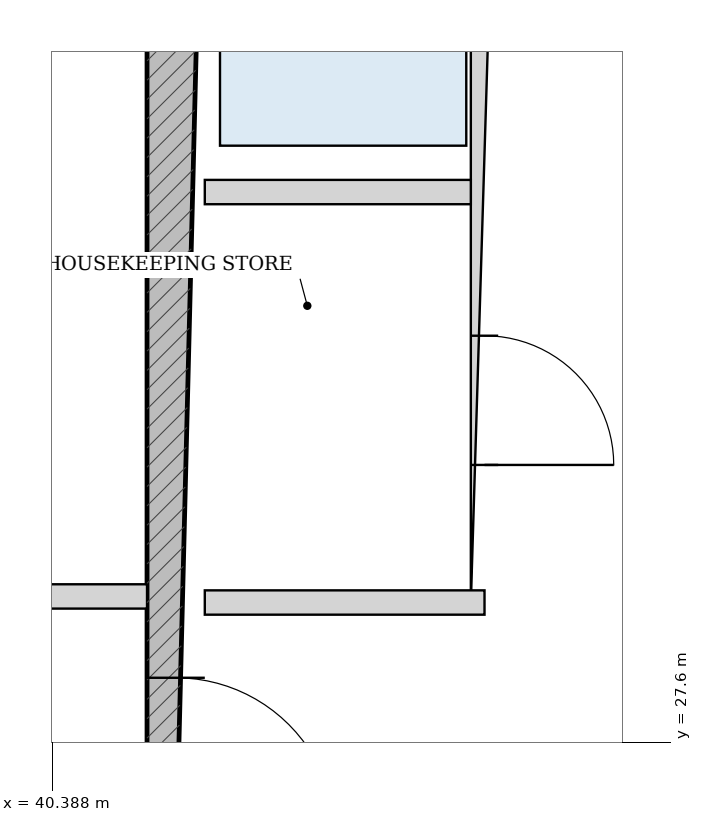
"""IFC4 building model, lengths in metres.
Left out: names, types, materials, properties, quantities, classifications, styles, units other than length and angle.
Written with IfcOpenShell. Run it as: python <this file> out.ifc"""

import sys

from ifc_helpers import new_model, si_unit, direction, frame, frame_2d, origin, place, context, subcontext, project, spatial, rectangle, extrude, source, transform, mapped, element, fill, save


model = new_model("IFC4")
c1 = context("Model", 3, precision=1e-05, world=origin(), true_north=direction((-0.2419218956, 0.970295726276)))
c2 = subcontext(c1, "Body", "Model", "MODEL_VIEW")
j1 = project(units=[si_unit("LENGTHUNIT", "METRE"), si_unit("PLANEANGLEUNIT", "RADIAN")], contexts=[c1])
p1 = place(None, origin())
s1 = spatial("IfcSite", under=j1, at=p1, CompositionType="ELEMENT")
p2 = place(p1, origin())
s2 = spatial("IfcBuilding", under=s1, at=p2, CompositionType="ELEMENT")
p3 = place(p2, frame((0.0, 0.0, 202.3)))
s3 = spatial("IfcBuildingStorey", under=s2, at=p3, CompositionType="ELEMENT", Elevation=202.3)
p4 = place(p3, frame((41.2, 19.175, 0.0), z_axis=(0.0, 0.0, 1.0), x_axis=(0.0, 1.0, 0.0)))
e1 = element("IfcWall", 1, at=p4, inside=s3, PredefinedType="SHEAR", context=c2, shape_type="SweptSolid", body=[
    extrude(rectangle(XDim=15.25, YDim=0.38, at=frame_2d((7.625, 0.0))), origin(), (0.0, 0.0, 1.0), 3.435),
])
p5 = place(p4, frame((7.8, 0.0, 0.0)))
e2 = element("IfcOpeningElement", 2, at=p5, cuts=e1, PredefinedType="OPENING", context=c2, shape_type="SweptSolid", body=[
    extrude(rectangle(XDim=1.05, YDim=2.15, at=frame_2d((0.525, 1.075))), frame((0.0, 0.2, 0.0), z_axis=(0.0, -1.0, 0.0), x_axis=(1.0, 0.0, 0.0)), (0.0, 0.0, 1.0), 0.4),
])
p6 = place(p3, frame((43.23, 28.52, 0.0), z_axis=(0.0, 0.0, 1.0), x_axis=(0.0, 1.0, 0.0)))
e3 = element("IfcWall", 3, at=p6, inside=s3, PredefinedType="PARTITIONING", context=c2, shape_type="SweptSolid", body=[
    extrude(rectangle(XDim=5.905, YDim=0.18, at=frame_2d((2.953, 0.0))), origin(), (0.0, 0.0, 1.0), 3.435),
])
p7 = place(p6, frame((0.905, 0.0, 0.0)))
e4 = element("IfcOpeningElement", 4, at=p7, cuts=e3, PredefinedType="OPENING", context=c2, shape_type="SweptSolid", body=[
    extrude(rectangle(XDim=0.85, YDim=2.1, at=frame_2d((0.425, 1.05))), frame((0.0, 0.1, 0.0), z_axis=(0.0, -1.0, 0.0), x_axis=(1.0, 0.0, 0.0)), (0.0, 0.0, 1.0), 0.2),
])
p8 = place(p6, frame((3.655, 0.0, 0.0)))
e5 = element("IfcOpeningElement", 5, at=p8, cuts=e3, PredefinedType="OPENING", context=c2, shape_type="SweptSolid", body=[
    extrude(rectangle(XDim=1.15, YDim=2.2, at=frame_2d((0.575, 1.1))), frame((0.0, 0.1, 0.0), z_axis=(0.0, -1.0, 0.0), x_axis=(1.0, 0.0, 0.0)), (0.0, 0.0, 1.0), 0.2),
])
p9 = place(p3, frame((41.39, 31.22, 0.0), z_axis=(0.0, 0.0, 1.0), x_axis=(1.0, 0.0, 0.0)))
e6 = element("IfcWall", 6, at=p9, inside=s3, PredefinedType="PARTITIONING", context=c2, shape_type="SweptSolid", body=[
    extrude(rectangle(XDim=1.75, YDim=0.16, at=frame_2d((0.875, 0.0))), origin(), (0.0, 0.0, 1.0), 3.435),
])
p10 = place(p3, frame((41.39, 28.52, 0.0), z_axis=(0.0, 0.0, 1.0), x_axis=(1.0, 0.0, 0.0)))
e7 = element("IfcWall", 7, at=p10, inside=s3, PredefinedType="PARTITIONING", context=c2, shape_type="SweptSolid", body=[
    extrude(rectangle(XDim=1.84, YDim=0.16, at=frame_2d((0.92, 0.0))), origin(), (0.0, 0.0, 1.0), 3.435),
])
p11 = place(p3, frame((34.99, 28.56, 0.0), z_axis=(0.0, 0.0, 1.0), x_axis=(1.0, 0.0, 0.0)))
e8 = element("IfcWall", 8, at=p11, inside=s3, PredefinedType="PARTITIONING", context=c2, shape_type="SweptSolid", body=[
    extrude(rectangle(XDim=6.02, YDim=0.16, at=frame_2d((3.01, 0.0))), origin(), (0.0, 0.0, 1.0), 3.435),
])
p12 = place(p11, frame((1.025, 0.0, 0.0)))
e9 = element("IfcOpeningElement", 9, at=p12, cuts=e8, PredefinedType="OPENING", context=c2, shape_type="SweptSolid", body=[
    extrude(rectangle(XDim=0.86, YDim=2.1, at=frame_2d((0.43, 1.05))), frame((0.0, 0.09, 0.0), z_axis=(0.0, -1.0, 0.0), x_axis=(1.0, 0.0, 0.0)), (0.0, 0.0, 1.0), 0.18),
])
p13 = place(p11, frame((4.14, 0.0, 0.0)))
e10 = element("IfcOpeningElement", 10, at=p13, cuts=e8, PredefinedType="OPENING", context=c2, shape_type="SweptSolid", body=[
    extrude(rectangle(XDim=0.85, YDim=2.1, at=frame_2d((0.425, 1.05))), frame((0.0, 0.09, 0.0), z_axis=(0.0, -1.0, 0.0), x_axis=(1.0, 0.0, 0.0)), (0.0, 0.0, 1.0), 0.18),
])
m1 = source(origin(), c2, "Body", "SweptSolid", [
    extrude(rectangle(XDim=1.05, YDim=2.15, at=frame_2d((0.525, 1.075))), frame((0.0, 0.025, 0.0), z_axis=(0.0, -1.0, 0.0), x_axis=(1.0, 0.0, 0.0)), (0.0, 0.0, 1.0), 0.05),
])
p14 = place(p5, frame((1.05, 0.0, 0.0), z_axis=(0.0, 0.0, 1.0), x_axis=(-1.0, 0.0, 0.0)))
e11 = element("IfcDoor", 11, at=p14, inside=s3, OperationType="SINGLE_SWING_RIGHT", PredefinedType="DOOR", context=c2, shape_type="MappedRepresentation", body=[
    mapped(m1, transform((0.0, 0.0, 0.0), scale=1.0)),
])
fill(e2, e11)
m2 = source(origin(), c2, "Body", "SweptSolid", [
    extrude(rectangle(XDim=0.85, YDim=2.1, at=frame_2d((0.425, 1.05))), frame((0.0, 0.025, 0.0), z_axis=(0.0, -1.0, 0.0), x_axis=(1.0, 0.0, 0.0)), (0.0, 0.0, 1.0), 0.05),
])
p15 = place(p7, frame((0.85, 0.0, 0.0), z_axis=(0.0, 0.0, 1.0), x_axis=(-1.0, 0.0, 0.0)))
e12 = element("IfcDoor", 12, at=p15, inside=s3, OperationType="SINGLE_SWING_RIGHT", PredefinedType="DOOR", context=c2, shape_type="MappedRepresentation", body=[
    mapped(m2, transform((0.0, 0.0, 0.0), scale=1.0)),
])
fill(e4, e12)
save(model, sys.argv[1])
